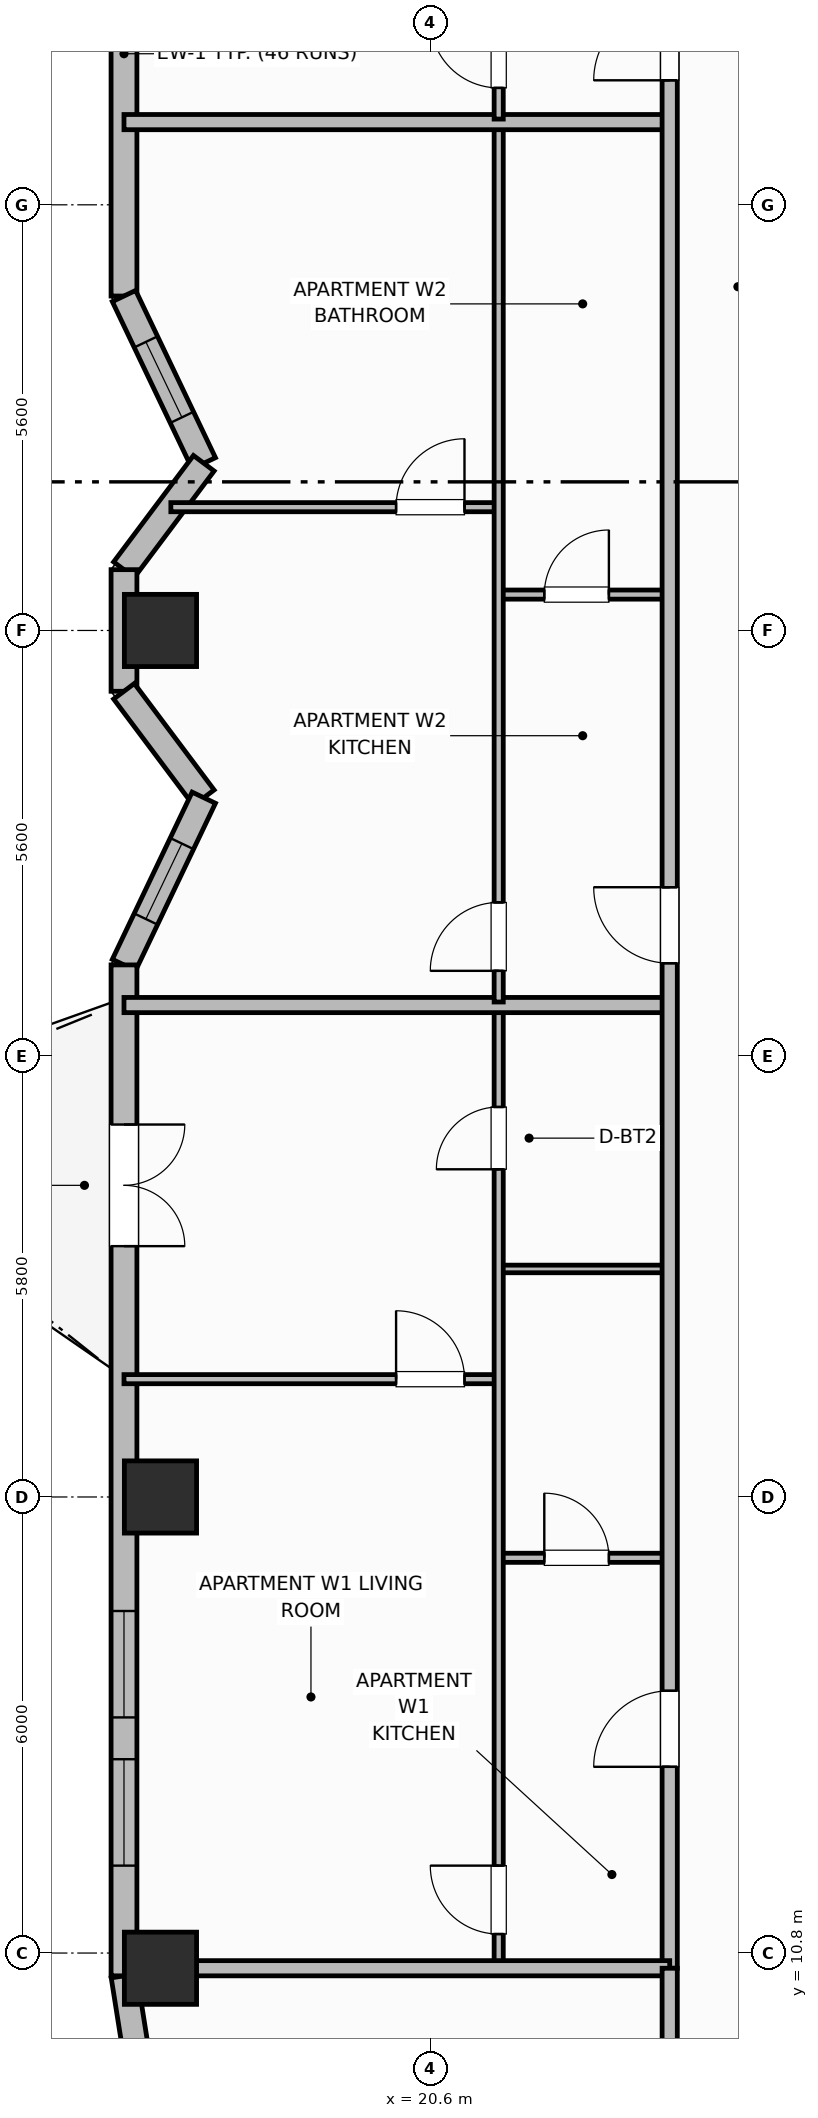
"""IFC4 building model, lengths in metres.
Left out: names, types, materials, properties, quantities, classifications, styles, units other than length and angle.
Written with IfcOpenShell. Run it as: python <this file> out.ifc"""

import sys

from ifc_helpers import new_model, si_unit, direction, frame, frame_2d, origin, origin_2d, place, context, subcontext, project, spatial, rectangle, extrude, element, fill, save


model = new_model("IFC4")
c1 = context("Model", 3, precision=1e-05, world=origin(), true_north=direction((0.0, 1.0)))
c2 = subcontext(c1, "Body", "Model", "MODEL_VIEW")
j1 = project(units=[si_unit("LENGTHUNIT", "METRE"), si_unit("PLANEANGLEUNIT", "RADIAN")], contexts=[c1])
p1 = place(None, origin())
s1 = spatial("IfcSite", under=j1, at=p1, CompositionType="ELEMENT")
p2 = place(p1, origin())
s2 = spatial("IfcBuilding", under=s1, at=p2, CompositionType="ELEMENT")
p3 = place(p2, frame((0.0, 0.0, 188.5)))
s3 = spatial("IfcBuildingStorey", under=s2, at=p3, CompositionType="ELEMENT", Elevation=188.5)
for number, where, z_axis, x_axis in (
    (1, (17.05, 10.6, 0.0), (0.0, 0.0, 1.0), (1.0, 0.0, 0.0)),
    (2, (17.05, 16.8, 0.0), (0.0, 0.0, 1.0), (1.0, 0.0, 0.0)),
    (3, (17.05, 28.2, 0.0), (0.0, 0.0, 1.0), (1.0, 0.0, 0.0)),
):
    element("IfcColumn", number, at=place(p3, frame(where, z_axis=z_axis, x_axis=x_axis)), inside=s3, PredefinedType="COLUMN", context=c2, shape_type="SweptSolid", body=[
        extrude(rectangle(XDim=0.95, YDim=0.95, at=origin_2d()), origin(), (0.0, 0.0, 1.0), 3.7),
    ])
p4 = place(p3, frame((16.57, 10.5, 0.0), z_axis=(0.0, 0.0, 1.0), x_axis=(0.156514556949, -0.987675651954, 0.0)))
e4 = element("IfcWall", 4, at=p4, inside=s3, PredefinedType="SOLIDWALL", context=c2, shape_type="SweptSolid", body=[
    extrude(rectangle(XDim=1.135, YDim=0.34, at=frame_2d((0.568, 0.0))), origin(), (0.0, 0.0, 1.0), 2.72),
])
p5 = place(p3, frame((16.57, 45.9, 0.0), z_axis=(0.0, 0.0, 1.0), x_axis=(0.0, -1.0, 0.0)))
e5 = element("IfcWall", 5, at=p5, inside=s3, PredefinedType="SOLIDWALL", context=c2, shape_type="SweptSolid", body=[
    extrude(rectangle(XDim=13.3, YDim=0.34, at=frame_2d((6.65, 0.0))), origin(), (0.0, 0.0, 1.0), 2.72),
])
p6 = place(p5, frame((1.35, 0.0, 0.7)))
e6 = element("IfcOpeningElement", 6, at=p6, cuts=e5, PredefinedType="OPENING", context=c2, shape_type="SweptSolid", body=[
    extrude(rectangle(XDim=1.6, YDim=1.9, at=frame_2d((0.8, 0.95))), frame((0.0, 0.18, 0.0), z_axis=(0.0, -1.0, 0.0), x_axis=(1.0, 0.0, 0.0)), (0.0, 0.0, 1.0), 0.36),
])
p7 = place(p5, frame((7.7, 0.0, 0.7)))
e7 = element("IfcOpeningElement", 7, at=p7, cuts=e5, PredefinedType="OPENING", context=c2, shape_type="SweptSolid", body=[
    extrude(rectangle(XDim=1.6, YDim=1.9, at=frame_2d((0.8, 0.95))), frame((0.0, 0.18, 0.0), z_axis=(0.0, -1.0, 0.0), x_axis=(1.0, 0.0, 0.0)), (0.0, 0.0, 1.0), 0.36),
])
p8 = place(p3, frame((16.57, 32.6, 0.0), z_axis=(0.0, 0.0, 1.0), x_axis=(0.430714756408, -0.902488115496, 0.0)))
e8 = element("IfcWall", 8, at=p8, inside=s3, PredefinedType="SOLIDWALL", context=c2, shape_type="SweptSolid", body=[
    extrude(rectangle(XDim=2.438, YDim=0.34, at=frame_2d((1.219, 0.0))), origin(), (0.0, 0.0, 1.0), 2.72),
])
p9 = place(p8, frame((0.669, 0.0, 0.91)))
e9 = element("IfcOpeningElement", 9, at=p9, cuts=e8, PredefinedType="OPENING", context=c2, shape_type="SweptSolid", body=[
    extrude(rectangle(XDim=1.1, YDim=1.65, at=frame_2d((0.55, 0.825))), frame((0.0, 0.18, 0.0), z_axis=(0.0, -1.0, 0.0), x_axis=(1.0, 0.0, 0.0)), (0.0, 0.0, 1.0), 0.36),
])
p10 = place(p3, frame((17.62, 30.4, 0.0), z_axis=(0.0, 0.0, 1.0), x_axis=(-0.600044643168, -0.799966515677, 0.0)))
e10 = element("IfcWall", 10, at=p10, inside=s3, PredefinedType="SOLIDWALL", context=c2, shape_type="SweptSolid", body=[
    extrude(rectangle(XDim=1.75, YDim=0.34, at=frame_2d((0.875, 0.0))), origin(), (0.0, 0.0, 1.0), 2.72),
])
p11 = place(p3, frame((16.57, 29.0, 0.0), z_axis=(0.0, 0.0, 1.0), x_axis=(0.0, -1.0, 0.0)))
e11 = element("IfcWall", 11, at=p11, inside=s3, PredefinedType="SOLIDWALL", context=c2, shape_type="SweptSolid", body=[
    extrude(rectangle(XDim=1.6, YDim=0.34, at=frame_2d((0.8, 0.0))), origin(), (0.0, 0.0, 1.0), 2.72),
])
p12 = place(p3, frame((16.57, 27.4, 0.0), z_axis=(0.0, 0.0, 1.0), x_axis=(0.600044643168, -0.799966515677, 0.0)))
e12 = element("IfcWall", 12, at=p12, inside=s3, PredefinedType="SOLIDWALL", context=c2, shape_type="SweptSolid", body=[
    extrude(rectangle(XDim=1.75, YDim=0.34, at=frame_2d((0.875, 0.0))), origin(), (0.0, 0.0, 1.0), 2.72),
])
p13 = place(p3, frame((17.62, 26.0, 0.0), z_axis=(0.0, 0.0, 1.0), x_axis=(-0.430753686581, -0.902469534941, 0.0)))
e13 = element("IfcWall", 13, at=p13, inside=s3, PredefinedType="SOLIDWALL", context=c2, shape_type="SweptSolid", body=[
    extrude(rectangle(XDim=2.438, YDim=0.34, at=frame_2d((1.219, 0.0))), origin(), (0.0, 0.0, 1.0), 2.72),
])
p14 = place(p13, frame((0.669, 0.0, 0.91)))
e14 = element("IfcOpeningElement", 14, at=p14, cuts=e13, PredefinedType="OPENING", context=c2, shape_type="SweptSolid", body=[
    extrude(rectangle(XDim=1.1, YDim=1.65, at=frame_2d((0.55, 0.825))), frame((0.0, 0.18, 0.0), z_axis=(0.0, -1.0, 0.0), x_axis=(1.0, 0.0, 0.0)), (0.0, 0.0, 1.0), 0.36),
])
p15 = place(p3, frame((16.57, 23.8, 0.0), z_axis=(0.0, 0.0, 1.0), x_axis=(0.0, -1.0, 0.0)))
e15 = element("IfcWall", 15, at=p15, inside=s3, PredefinedType="SOLIDWALL", context=c2, shape_type="SweptSolid", body=[
    extrude(rectangle(XDim=13.3, YDim=0.34, at=frame_2d((6.65, 0.0))), origin(), (0.0, 0.0, 1.0), 2.72),
])
p16 = place(p15, frame((2.1, 0.0, 0.0)))
e16 = element("IfcOpeningElement", 16, at=p16, cuts=e15, PredefinedType="OPENING", context=c2, shape_type="SweptSolid", body=[
    extrude(rectangle(XDim=1.6, YDim=2.1, at=frame_2d((0.8, 1.05))), frame((0.0, 0.18, 0.0), z_axis=(0.0, -1.0, 0.0), x_axis=(1.0, 0.0, 0.0)), (0.0, 0.0, 1.0), 0.36),
])
p17 = place(p15, frame((8.5, 0.0, 0.75)))
e17 = element("IfcOpeningElement", 17, at=p17, cuts=e15, PredefinedType="OPENING", context=c2, shape_type="SweptSolid", body=[
    extrude(rectangle(XDim=1.4, YDim=1.85, at=frame_2d((0.7, 0.925))), frame((0.0, 0.18, 0.0), z_axis=(0.0, -1.0, 0.0), x_axis=(1.0, 0.0, 0.0)), (0.0, 0.0, 1.0), 0.36),
])
p18 = place(p15, frame((10.45, 0.0, 0.75)))
e18 = element("IfcOpeningElement", 18, at=p18, cuts=e15, PredefinedType="OPENING", context=c2, shape_type="SweptSolid", body=[
    extrude(rectangle(XDim=1.4, YDim=1.85, at=frame_2d((0.7, 0.925))), frame((0.0, 0.18, 0.0), z_axis=(0.0, -1.0, 0.0), x_axis=(1.0, 0.0, 0.0)), (0.0, 0.0, 1.0), 0.36),
])
p19 = place(p3, frame((21.5, 16.0, 0.0), z_axis=(0.0, 0.0, 1.0), x_axis=(1.0, 0.0, 0.0)))
e19 = element("IfcWall", 19, at=p19, inside=s3, PredefinedType="PARTITIONING", context=c2, shape_type="SweptSolid", body=[
    extrude(rectangle(XDim=2.25, YDim=0.12, at=frame_2d((1.125, 0.0))), origin(), (0.0, 0.0, 1.0), 2.55),
])
p20 = place(p19, frame((0.6, 0.0, 0.0)))
e20 = element("IfcOpeningElement", 20, at=p20, cuts=e19, PredefinedType="OPENING", context=c2, shape_type="SweptSolid", body=[
    extrude(rectangle(XDim=0.85, YDim=2.1, at=frame_2d((0.425, 1.05))), frame((0.0, 0.07, 0.0), z_axis=(0.0, -1.0, 0.0), x_axis=(1.0, 0.0, 0.0)), (0.0, 0.0, 1.0), 0.14),
])
p21 = place(p3, frame((21.5, 19.8, 0.0), z_axis=(0.0, 0.0, 1.0), x_axis=(1.0, 0.0, 0.0)))
e21 = element("IfcWall", 21, at=p21, inside=s3, PredefinedType="PARTITIONING", context=c2, shape_type="SweptSolid", body=[
    extrude(rectangle(XDim=2.25, YDim=0.1, at=frame_2d((1.125, 0.0))), origin(), (0.0, 0.0, 1.0), 2.55),
])
p22 = place(p3, frame((16.57, 18.35, 0.0), z_axis=(0.0, 0.0, 1.0), x_axis=(1.0, 0.0, 0.0)))
e22 = element("IfcWall", 22, at=p22, inside=s3, PredefinedType="PARTITIONING", context=c2, shape_type="SweptSolid", body=[
    extrude(rectangle(XDim=4.93, YDim=0.12, at=frame_2d((2.465, 0.0))), origin(), (0.0, 0.0, 1.0), 2.55),
])
p23 = place(p22, frame((3.58, 0.0, 0.0)))
e23 = element("IfcOpeningElement", 23, at=p23, cuts=e22, PredefinedType="OPENING", context=c2, shape_type="SweptSolid", body=[
    extrude(rectangle(XDim=0.9, YDim=2.1, at=frame_2d((0.45, 1.05))), frame((0.0, 0.07, 0.0), z_axis=(0.0, -1.0, 0.0), x_axis=(1.0, 0.0, 0.0)), (0.0, 0.0, 1.0), 0.14),
])
p24 = place(p3, frame((21.5, 10.64, 0.0), z_axis=(0.0, 0.0, 1.0), x_axis=(0.0, 1.0, 0.0)))
e24 = element("IfcWall", 24, at=p24, inside=s3, PredefinedType="PARTITIONING", context=c2, shape_type="SweptSolid", body=[
    extrude(rectangle(XDim=12.592, YDim=0.12, at=frame_2d((6.296, 0.0))), origin(), (0.0, 0.0, 1.0), 2.55),
])
p25 = place(p24, frame((0.41, 0.0, 0.0)))
e25 = element("IfcOpeningElement", 25, at=p25, cuts=e24, PredefinedType="OPENING", context=c2, shape_type="SweptSolid", body=[
    extrude(rectangle(XDim=0.9, YDim=2.1, at=frame_2d((0.45, 1.05))), frame((0.0, 0.07, 0.0), z_axis=(0.0, -1.0, 0.0), x_axis=(1.0, 0.0, 0.0)), (0.0, 0.0, 1.0), 0.14),
])
p26 = place(p24, frame((10.471, 0.0, 0.0)))
e26 = element("IfcOpeningElement", 26, at=p26, cuts=e24, PredefinedType="OPENING", context=c2, shape_type="SweptSolid", body=[
    extrude(rectangle(XDim=0.82, YDim=2.08, at=frame_2d((0.41, 1.04))), frame((0.0, 0.07, 0.0), z_axis=(0.0, -1.0, 0.0), x_axis=(1.0, 0.0, 0.0)), (0.0, 0.0, 1.0), 0.14),
])
p27 = place(p3, frame((16.57, 23.272, 0.0), z_axis=(0.0, 0.0, 1.0), x_axis=(1.0, 0.0, 0.0)))
e27 = element("IfcWall", 27, at=p27, inside=s3, PredefinedType="PARTITIONING", context=c2, shape_type="SweptSolid", body=[
    extrude(rectangle(XDim=7.18, YDim=0.2, at=frame_2d((3.59, 0.0))), origin(), (0.0, 0.0, 1.0), 2.55),
])
p28 = place(p3, frame((21.5, 28.672, 0.0), z_axis=(0.0, 0.0, 1.0), x_axis=(1.0, 0.0, 0.0)))
e28 = element("IfcWall", 28, at=p28, inside=s3, PredefinedType="PARTITIONING", context=c2, shape_type="SweptSolid", body=[
    extrude(rectangle(XDim=2.25, YDim=0.12, at=frame_2d((1.125, 0.0))), origin(), (0.0, 0.0, 1.0), 2.55),
])
p29 = place(p28, frame((0.6, 0.0, 0.0)))
e29 = element("IfcOpeningElement", 29, at=p29, cuts=e28, PredefinedType="OPENING", context=c2, shape_type="SweptSolid", body=[
    extrude(rectangle(XDim=0.85, YDim=2.1, at=frame_2d((0.425, 1.05))), frame((0.0, 0.07, 0.0), z_axis=(0.0, -1.0, 0.0), x_axis=(1.0, 0.0, 0.0)), (0.0, 0.0, 1.0), 0.14),
])
p30 = place(p3, frame((17.187, 29.822, 0.0), z_axis=(0.0, 0.0, 1.0), x_axis=(1.0, 0.0, 0.0)))
e30 = element("IfcWall", 30, at=p30, inside=s3, PredefinedType="PARTITIONING", context=c2, shape_type="SweptSolid", body=[
    extrude(rectangle(XDim=4.313, YDim=0.12, at=frame_2d((2.157, 0.0))), origin(), (0.0, 0.0, 1.0), 2.55),
])
p31 = place(p30, frame((2.963, 0.0, 0.0)))
e31 = element("IfcOpeningElement", 31, at=p31, cuts=e30, PredefinedType="OPENING", context=c2, shape_type="SweptSolid", body=[
    extrude(rectangle(XDim=0.9, YDim=2.1, at=frame_2d((0.45, 1.05))), frame((0.0, 0.07, 0.0), z_axis=(0.0, -1.0, 0.0), x_axis=(1.0, 0.0, 0.0)), (0.0, 0.0, 1.0), 0.14),
])
p32 = place(p3, frame((21.5, 23.312, 0.0), z_axis=(0.0, 0.0, 1.0), x_axis=(0.0, 1.0, 0.0)))
e32 = element("IfcWall", 32, at=p32, inside=s3, PredefinedType="PARTITIONING", context=c2, shape_type="SweptSolid", body=[
    extrude(rectangle(XDim=11.536, YDim=0.12, at=frame_2d((5.768, 0.0))), origin(), (0.0, 0.0, 1.0), 2.55),
])
p33 = place(p32, frame((0.41, 0.0, 0.0)))
e33 = element("IfcOpeningElement", 33, at=p33, cuts=e32, PredefinedType="OPENING", context=c2, shape_type="SweptSolid", body=[
    extrude(rectangle(XDim=0.9, YDim=2.1, at=frame_2d((0.45, 1.05))), frame((0.0, 0.07, 0.0), z_axis=(0.0, -1.0, 0.0), x_axis=(1.0, 0.0, 0.0)), (0.0, 0.0, 1.0), 0.14),
])
p34 = place(p3, frame((16.57, 34.888, 0.0), z_axis=(0.0, 0.0, 1.0), x_axis=(1.0, 0.0, 0.0)))
e34 = element("IfcWall", 34, at=p34, inside=s3, PredefinedType="PARTITIONING", context=c2, shape_type="SweptSolid", body=[
    extrude(rectangle(XDim=7.18, YDim=0.2, at=frame_2d((3.59, 0.0))), origin(), (0.0, 0.0, 1.0), 2.55),
])
p35 = place(p3, frame((21.5, 34.928, 0.0), z_axis=(0.0, 0.0, 1.0), x_axis=(0.0, 1.0, 0.0)))
e35 = element("IfcWall", 35, at=p35, inside=s3, PredefinedType="PARTITIONING", context=c2, shape_type="SweptSolid", body=[
    extrude(rectangle(XDim=10.832, YDim=0.12, at=frame_2d((5.416, 0.0))), origin(), (0.0, 0.0, 1.0), 2.55),
])
p36 = place(p35, frame((0.41, 0.0, 0.0)))
e36 = element("IfcOpeningElement", 36, at=p36, cuts=e35, PredefinedType="OPENING", context=c2, shape_type="SweptSolid", body=[
    extrude(rectangle(XDim=0.9, YDim=2.1, at=frame_2d((0.45, 1.05))), frame((0.0, 0.07, 0.0), z_axis=(0.0, -1.0, 0.0), x_axis=(1.0, 0.0, 0.0)), (0.0, 0.0, 1.0), 0.14),
])
p37 = place(p3, frame((23.75, 10.6, 0.0), z_axis=(0.0, 0.0, 1.0), x_axis=(0.0, 1.0, 0.0)))
e37 = element("IfcWall", 37, at=p37, inside=s3, PredefinedType="PARTITIONING", context=c2, shape_type="SweptSolid", body=[
    extrude(rectangle(XDim=35.2, YDim=0.2, at=frame_2d((17.6, 0.0))), origin(), (0.0, 0.0, 1.0), 2.55),
])
p38 = place(p37, frame((2.65, 0.0, 0.0)))
e38 = element("IfcOpeningElement", 38, at=p38, cuts=e37, PredefinedType="OPENING", context=c2, shape_type="SweptSolid", body=[
    extrude(rectangle(XDim=1.0, YDim=2.15, at=frame_2d((0.5, 1.075))), frame((0.0, 0.11, 0.0), z_axis=(0.0, -1.0, 0.0), x_axis=(1.0, 0.0, 0.0)), (0.0, 0.0, 1.0), 0.22),
])
p39 = place(p37, frame((13.222, 0.0, 0.0)))
e39 = element("IfcOpeningElement", 39, at=p39, cuts=e37, PredefinedType="OPENING", context=c2, shape_type="SweptSolid", body=[
    extrude(rectangle(XDim=1.0, YDim=2.15, at=frame_2d((0.5, 1.075))), frame((0.0, 0.11, 0.0), z_axis=(0.0, -1.0, 0.0), x_axis=(1.0, 0.0, 0.0)), (0.0, 0.0, 1.0), 0.22),
])
p40 = place(p37, frame((24.838, 0.0, 0.0)))
e40 = element("IfcOpeningElement", 40, at=p40, cuts=e37, PredefinedType="OPENING", context=c2, shape_type="SweptSolid", body=[
    extrude(rectangle(XDim=1.0, YDim=2.15, at=frame_2d((0.5, 1.075))), frame((0.0, 0.11, 0.0), z_axis=(0.0, -1.0, 0.0), x_axis=(1.0, 0.0, 0.0)), (0.0, 0.0, 1.0), 0.22),
])
p41 = place(p3, frame((16.99, 10.6, 0.0), z_axis=(0.0, 0.0, 1.0), x_axis=(1.0, 0.0, 0.0)))
e41 = element("IfcWall", 41, at=p41, inside=s3, PredefinedType="PARTITIONING", context=c2, shape_type="SweptSolid", body=[
    extrude(rectangle(XDim=6.76, YDim=0.2, at=frame_2d((3.38, 0.0))), origin(), (0.0, 0.0, 1.0), 2.55),
])
p42 = place(p3, frame((23.75, 6.87, 0.0), z_axis=(0.0, 0.0, 1.0), x_axis=(0.0, 1.0, 0.0)))
e42 = element("IfcWall", 42, at=p42, inside=s3, PredefinedType="PARTITIONING", context=c2, shape_type="SweptSolid", body=[
    extrude(rectangle(XDim=3.73, YDim=0.2, at=frame_2d((1.865, 0.0))), origin(), (0.0, 0.0, 1.0), 2.55),
])
p43 = place(p9, origin())
e43 = element("IfcWindow", 43, at=p43, inside=s3, PartitioningType="SINGLE_PANEL", PredefinedType="WINDOW", context=c2, shape_type="SweptSolid", body=[
    extrude(rectangle(XDim=1.1, YDim=1.65, at=frame_2d((0.55, 0.825))), frame((0.0, 0.03, 0.0), z_axis=(0.0, -1.0, 0.0), x_axis=(1.0, 0.0, 0.0)), (0.0, 0.0, 1.0), 0.06),
])
fill(e9, e43)
p44 = place(p14, origin())
e44 = element("IfcWindow", 44, at=p44, inside=s3, PartitioningType="SINGLE_PANEL", PredefinedType="WINDOW", context=c2, shape_type="SweptSolid", body=[
    extrude(rectangle(XDim=1.1, YDim=1.65, at=frame_2d((0.55, 0.825))), frame((0.0, 0.03, 0.0), z_axis=(0.0, -1.0, 0.0), x_axis=(1.0, 0.0, 0.0)), (0.0, 0.0, 1.0), 0.06),
])
fill(e14, e44)
p45 = place(p16, origin())
e45 = element("IfcDoor", 45, at=p45, inside=s3, OperationType="DOUBLE_DOOR_SINGLE_SWING", PredefinedType="DOOR", context=c2, shape_type="SweptSolid", body=[
    extrude(rectangle(XDim=1.6, YDim=2.1, at=frame_2d((0.8, 1.05))), frame((0.0, 0.025, 0.0), z_axis=(0.0, -1.0, 0.0), x_axis=(1.0, 0.0, 0.0)), (0.0, 0.0, 1.0), 0.05),
])
fill(e16, e45)
p46 = place(p17, origin())
e46 = element("IfcWindow", 46, at=p46, inside=s3, PartitioningType="SINGLE_PANEL", PredefinedType="WINDOW", context=c2, shape_type="SweptSolid", body=[
    extrude(rectangle(XDim=1.4, YDim=1.85, at=frame_2d((0.7, 0.925))), frame((0.0, 0.03, 0.0), z_axis=(0.0, -1.0, 0.0), x_axis=(1.0, 0.0, 0.0)), (0.0, 0.0, 1.0), 0.06),
])
fill(e17, e46)
p47 = place(p18, origin())
e47 = element("IfcWindow", 47, at=p47, inside=s3, PartitioningType="SINGLE_PANEL", PredefinedType="WINDOW", context=c2, shape_type="SweptSolid", body=[
    extrude(rectangle(XDim=1.4, YDim=1.85, at=frame_2d((0.7, 0.925))), frame((0.0, 0.03, 0.0), z_axis=(0.0, -1.0, 0.0), x_axis=(1.0, 0.0, 0.0)), (0.0, 0.0, 1.0), 0.06),
])
fill(e18, e47)
p48 = place(p20, origin())
e48 = element("IfcDoor", 48, at=p48, inside=s3, OperationType="SINGLE_SWING_LEFT", PredefinedType="DOOR", context=c2, shape_type="SweptSolid", body=[
    extrude(rectangle(XDim=0.85, YDim=2.1, at=frame_2d((0.425, 1.05))), frame((0.0, 0.025, 0.0), z_axis=(0.0, -1.0, 0.0), x_axis=(1.0, 0.0, 0.0)), (0.0, 0.0, 1.0), 0.05),
])
fill(e20, e48)
p49 = place(p23, origin())
e49 = element("IfcDoor", 49, at=p49, inside=s3, OperationType="SINGLE_SWING_LEFT", PredefinedType="DOOR", context=c2, shape_type="SweptSolid", body=[
    extrude(rectangle(XDim=0.9, YDim=2.1, at=frame_2d((0.45, 1.05))), frame((0.0, 0.025, 0.0), z_axis=(0.0, -1.0, 0.0), x_axis=(1.0, 0.0, 0.0)), (0.0, 0.0, 1.0), 0.05),
])
fill(e23, e49)
p50 = place(p25, origin())
e50 = element("IfcDoor", 50, at=p50, inside=s3, OperationType="SINGLE_SWING_RIGHT", PredefinedType="DOOR", context=c2, shape_type="SweptSolid", body=[
    extrude(rectangle(XDim=0.9, YDim=2.1, at=frame_2d((0.45, 1.05))), frame((0.0, 0.025, 0.0), z_axis=(0.0, -1.0, 0.0), x_axis=(1.0, 0.0, 0.0)), (0.0, 0.0, 1.0), 0.05),
])
fill(e25, e50)
p51 = place(p26, origin())
e51 = element("IfcDoor", 51, at=p51, inside=s3, OperationType="SINGLE_SWING_LEFT", PredefinedType="DOOR", context=c2, shape_type="SweptSolid", body=[
    extrude(rectangle(XDim=0.82, YDim=2.08, at=frame_2d((0.41, 1.04))), frame((0.0, 0.025, 0.0), z_axis=(0.0, -1.0, 0.0), x_axis=(1.0, 0.0, 0.0)), (0.0, 0.0, 1.0), 0.05),
])
fill(e26, e51)
p52 = place(p29, origin())
e52 = element("IfcDoor", 52, at=p52, inside=s3, OperationType="SINGLE_SWING_RIGHT", PredefinedType="DOOR", context=c2, shape_type="SweptSolid", body=[
    extrude(rectangle(XDim=0.85, YDim=2.1, at=frame_2d((0.425, 1.05))), frame((0.0, 0.025, 0.0), z_axis=(0.0, -1.0, 0.0), x_axis=(1.0, 0.0, 0.0)), (0.0, 0.0, 1.0), 0.05),
])
fill(e29, e52)
p53 = place(p31, origin())
e53 = element("IfcDoor", 53, at=p53, inside=s3, OperationType="SINGLE_SWING_RIGHT", PredefinedType="DOOR", context=c2, shape_type="SweptSolid", body=[
    extrude(rectangle(XDim=0.9, YDim=2.1, at=frame_2d((0.45, 1.05))), frame((0.0, 0.025, 0.0), z_axis=(0.0, -1.0, 0.0), x_axis=(1.0, 0.0, 0.0)), (0.0, 0.0, 1.0), 0.05),
])
fill(e31, e53)
p54 = place(p33, origin())
e54 = element("IfcDoor", 54, at=p54, inside=s3, OperationType="SINGLE_SWING_LEFT", PredefinedType="DOOR", context=c2, shape_type="SweptSolid", body=[
    extrude(rectangle(XDim=0.9, YDim=2.1, at=frame_2d((0.45, 1.05))), frame((0.0, 0.025, 0.0), z_axis=(0.0, -1.0, 0.0), x_axis=(1.0, 0.0, 0.0)), (0.0, 0.0, 1.0), 0.05),
])
fill(e33, e54)
p55 = place(p36, origin())
e55 = element("IfcDoor", 55, at=p55, inside=s3, OperationType="SINGLE_SWING_RIGHT", PredefinedType="DOOR", context=c2, shape_type="SweptSolid", body=[
    extrude(rectangle(XDim=0.9, YDim=2.1, at=frame_2d((0.45, 1.05))), frame((0.0, 0.025, 0.0), z_axis=(0.0, -1.0, 0.0), x_axis=(1.0, 0.0, 0.0)), (0.0, 0.0, 1.0), 0.05),
])
fill(e36, e55)
p56 = place(p38, origin())
e56 = element("IfcDoor", 56, at=p56, inside=s3, OperationType="SINGLE_SWING_LEFT", PredefinedType="DOOR", context=c2, shape_type="SweptSolid", body=[
    extrude(rectangle(XDim=1.0, YDim=2.15, at=frame_2d((0.5, 1.075))), frame((0.0, 0.025, 0.0), z_axis=(0.0, -1.0, 0.0), x_axis=(1.0, 0.0, 0.0)), (0.0, 0.0, 1.0), 0.05),
])
fill(e38, e56)
p57 = place(p39, origin())
e57 = element("IfcDoor", 57, at=p57, inside=s3, OperationType="SINGLE_SWING_RIGHT", PredefinedType="DOOR", context=c2, shape_type="SweptSolid", body=[
    extrude(rectangle(XDim=1.0, YDim=2.15, at=frame_2d((0.5, 1.075))), frame((0.0, 0.025, 0.0), z_axis=(0.0, -1.0, 0.0), x_axis=(1.0, 0.0, 0.0)), (0.0, 0.0, 1.0), 0.05),
])
fill(e39, e57)
p58 = place(p40, origin())
e58 = element("IfcDoor", 58, at=p58, inside=s3, OperationType="SINGLE_SWING_LEFT", PredefinedType="DOOR", context=c2, shape_type="SweptSolid", body=[
    extrude(rectangle(XDim=1.0, YDim=2.15, at=frame_2d((0.5, 1.075))), frame((0.0, 0.025, 0.0), z_axis=(0.0, -1.0, 0.0), x_axis=(1.0, 0.0, 0.0)), (0.0, 0.0, 1.0), 0.05),
])
fill(e40, e58)
save(model, sys.argv[1])
